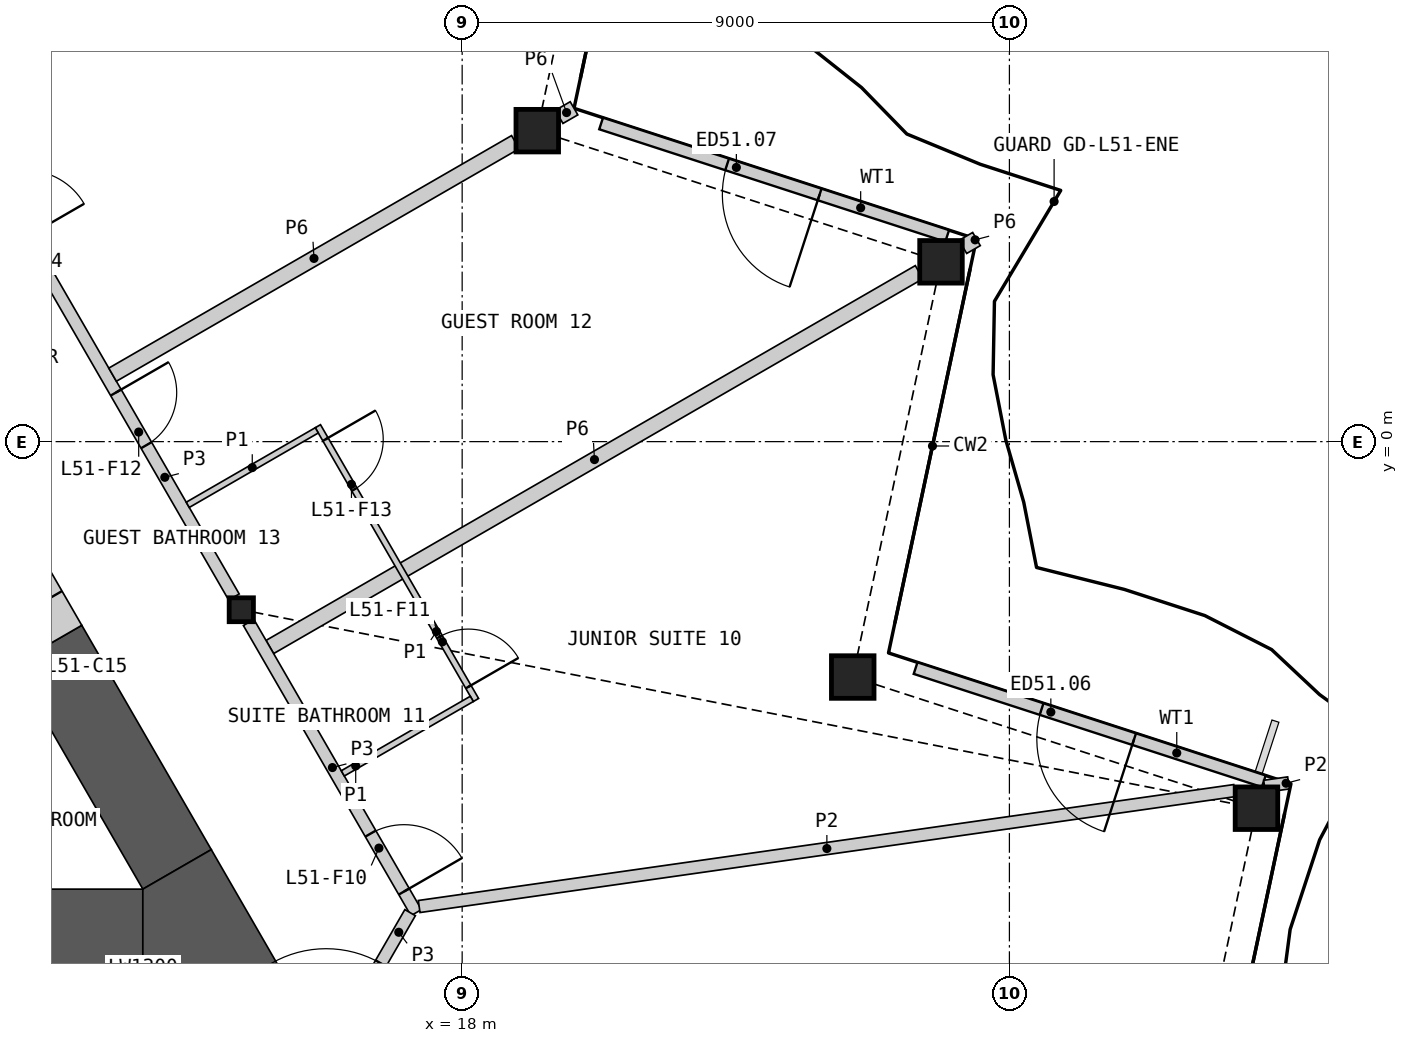
"""IFC4 building model, lengths in metres.
Left out: names, types, materials, properties, quantities, classifications, styles, units other than length and angle.
Written with IfcOpenShell. Run it as: python <this file> out.ifc"""

import sys

from ifc_helpers import new_model, si_unit, direction, frame, frame_2d, origin, origin_2d, place, context, subcontext, project, spatial, polyline, rectangle, hollow_rectangle, i_section, outline, extrude, element, fill, save


model = new_model("IFC4")
c1 = context("Model", 3, precision=1e-05, world=origin(), true_north=direction((0.0, 1.0)))
c2 = subcontext(c1, "Body", "Model", "MODEL_VIEW")
j1 = project(units=[si_unit("LENGTHUNIT", "METRE"), si_unit("PLANEANGLEUNIT", "RADIAN")], contexts=[c1])
p1 = place(None, origin())
s1 = spatial("IfcSite", under=j1, at=p1, CompositionType="ELEMENT")
p2 = place(p1, origin())
s2 = spatial("IfcBuilding", under=s1, at=p2, CompositionType="ELEMENT")
p3 = place(p2, frame((0.0, 0.0, 234.6)))
s3 = spatial("IfcBuildingStorey", under=s2, at=p3, CompositionType="ELEMENT", Elevation=234.6)
for number, where, z_axis, x_axis in (
    (1, (31.063, -6.029, 0.0), (0.0, 0.0, 1.0), (1.0, 0.0, 0.0)),
    (2, (24.423, -3.872, 0.0), (0.0, 0.0, 1.0), (1.0, 0.0, 0.0)),
    (3, (25.875, 2.957, 0.0), (0.0, 0.0, 1.0), (1.0, 0.0, 0.0)),
    (4, (19.235, 5.115, 0.0), (0.0, 0.0, 1.0), (1.0, 0.0, 0.0)),
):
    element("IfcColumn", number, at=place(p3, frame(where, z_axis=z_axis, x_axis=x_axis)), inside=s3, PredefinedType="COLUMN", context=c2, shape_type="SweptSolid", body=[
        extrude(hollow_rectangle(XDim=0.7, YDim=0.7, WallThickness=0.045, at=origin_2d()), origin(), (0.0, 0.0, 1.0), 3.6),
    ])
p4 = place(p3, frame((14.368, -2.765, 0.0), z_axis=(0.0, 0.0, 1.0), x_axis=(1.0, 0.0, 0.0)))
e5 = element("IfcColumn", 5, at=p4, inside=s3, PredefinedType="COLUMN", context=c2, shape_type="SweptSolid", body=[
    extrude(i_section(OverallWidth=0.399, OverallDepth=0.393, WebThickness=0.023, FlangeThickness=0.037, at=origin_2d()), origin(), (0.0, 0.0, 1.0), 3.6),
])
p5 = place(p3, frame((31.184, -5.586, 0.0), z_axis=(0.0, 0.0, 1.0), x_axis=(-0.95106415783, 0.30899347516, 0.0)))
e6 = element("IfcWall", 6, at=p5, inside=s3, PredefinedType="SOLIDWALL", context=c2, shape_type="SweptSolid", body=[
    extrude(rectangle(XDim=6.021, YDim=0.2, at=frame_2d((3.011, 0.0))), origin(), (0.0, 0.0, 1.0), 2.701),
])
p6 = place(p5, frame((2.243, 0.0, 0.0)))
e7 = element("IfcOpeningElement", 7, at=p6, cuts=e6, PredefinedType="OPENING", context=c2, shape_type="SweptSolid", body=[
    extrude(rectangle(XDim=1.6, YDim=2.4, at=frame_2d((0.8, 1.2))), frame((0.0, 0.11, 0.0), z_axis=(0.0, -1.0, 0.0), x_axis=(1.0, 0.0, 0.0)), (0.0, 0.0, 1.0), 0.22),
])
p7 = place(p3, frame((25.977, 3.383, 0.0), z_axis=(0.0, 0.0, 1.0), x_axis=(-0.951062846307, 0.308997511922, 0.0)))
e8 = element("IfcWall", 8, at=p7, inside=s3, PredefinedType="SOLIDWALL", context=c2, shape_type="SweptSolid", body=[
    extrude(rectangle(XDim=5.984, YDim=0.2, at=frame_2d((2.992, 0.0))), origin(), (0.0, 0.0, 1.0), 2.701),
])
p8 = place(p7, frame((2.206, 0.0, 0.0)))
e9 = element("IfcOpeningElement", 9, at=p8, cuts=e8, PredefinedType="OPENING", context=c2, shape_type="SweptSolid", body=[
    extrude(rectangle(XDim=1.6, YDim=2.4, at=frame_2d((0.8, 1.2))), frame((0.0, 0.11, 0.0), z_axis=(0.0, -1.0, 0.0), x_axis=(1.0, 0.0, 0.0)), (0.0, 0.0, 1.0), 0.22),
])
p9 = place(p3, frame((-12.748, -8.01, 0.0), z_axis=(0.0, 0.0, 1.0), x_axis=(1.0, 0.0, 0.0)))
e10 = element("IfcWall", 10, at=p9, inside=s3, PredefinedType="SHEAR", context=c2, shape_type="SweptSolid", body=[
    extrude(rectangle(XDim=25.497, YDim=1.3, at=frame_2d((12.748, 0.0))), origin(), (0.0, 0.0, 1.0), 3.25),
])
p10 = place(p3, frame((13.311, -7.035, 0.0), z_axis=(0.0, 0.0, 1.0), x_axis=(-0.500003555838, 0.866023350811, 0.0)))
e11 = element("IfcWall", 11, at=p10, inside=s3, PredefinedType="SHEAR", context=c2, shape_type="SweptSolid", body=[
    extrude(rectangle(XDim=4.26, YDim=1.3, at=frame_2d((2.13, 0.0))), origin(), (0.0, 0.0, 1.0), 3.25),
])
p11 = place(p3, origin())
e12 = element("IfcWall", 12, at=p11, inside=s3, PredefinedType="SHEAR", context=c2, shape_type="SweptSolid", body=[
    extrude(outline(polyline([(12.748, -8.66), (12.748, -7.36), (13.874, -6.71), (15.0, -8.66), (12.748, -8.66)])), origin(), (0.0, 0.0, 1.0), 3.25),
])
p12 = place(p3, frame((11.181, -3.346, 0.0), z_axis=(0.0, 0.0, 1.0), x_axis=(-0.499946605688, 0.86605622881, 0.0)))
e13 = element("IfcWall", 13, at=p12, inside=s3, PredefinedType="SHEAR", context=c2, shape_type="SweptSolid", body=[
    extrude(rectangle(XDim=2.2, YDim=1.3, at=frame_2d((1.1, 0.0))), origin(), (0.0, 0.0, 1.0), 3.25),
])
p13 = place(p12, frame((0.65, 0.0, 0.0)))
e14 = element("IfcOpeningElement", 14, at=p13, cuts=e13, PredefinedType="OPENING", context=c2, shape_type="SweptSolid", body=[
    extrude(rectangle(XDim=1.0, YDim=2.1, at=frame_2d((0.5, 1.05))), frame((0.0, 0.66, 0.0), z_axis=(0.0, -1.0, 0.0), x_axis=(1.0, 0.0, 0.0)), (0.0, 0.0, 1.0), 1.32),
])
p14 = place(p3, frame((14.837, -3.378, 0.0), z_axis=(0.0, 0.0, 1.0), x_axis=(0.866021706022, 0.500006404657, 0.0)))
e15 = element("IfcWall", 15, at=p14, inside=s3, PredefinedType="PARTITIONING", context=c2, shape_type="SweptSolid", body=[
    extrude(rectangle(XDim=12.33, YDim=0.25, at=frame_2d((6.165, 0.0))), origin(), (0.0, 0.0, 1.0), 2.404),
])
p15 = place(p3, frame((9.699, 5.321, 0.0), z_axis=(0.0, 0.0, 1.0), x_axis=(0.49998193945, -0.866035830797, 0.0)))
e16 = element("IfcWall", 16, at=p15, inside=s3, PredefinedType="PARTITIONING", context=c2, shape_type="SweptSolid", body=[
    extrude(rectangle(XDim=9.094, YDim=0.2, at=frame_2d((4.547, 0.0))), origin(), (0.0, 0.0, 1.0), 3.25),
])
p16 = place(p15, frame((5.212, 0.0, 0.0)))
e17 = element("IfcOpeningElement", 17, at=p16, cuts=e16, PredefinedType="OPENING", context=c2, shape_type="SweptSolid", body=[
    extrude(rectangle(XDim=1.0, YDim=2.1, at=frame_2d((0.5, 1.05))), frame((0.0, 0.11, 0.0), z_axis=(0.0, -1.0, 0.0), x_axis=(1.0, 0.0, 0.0)), (0.0, 0.0, 1.0), 0.22),
])
p17 = place(p15, frame((1.162, 0.0, 0.0)))
e18 = element("IfcOpeningElement", 18, at=p17, cuts=e16, PredefinedType="OPENING", context=c2, shape_type="SweptSolid", body=[
    extrude(rectangle(XDim=1.1, YDim=2.1, at=frame_2d((0.55, 1.05))), frame((0.0, 0.11, 0.0), z_axis=(0.0, -1.0, 0.0), x_axis=(1.0, 0.0, 0.0)), (0.0, 0.0, 1.0), 0.22),
])
p18 = place(p3, frame((12.251, 1.101, 0.0), z_axis=(0.0, 0.0, 1.0), x_axis=(0.866020808234, 0.500007959642, 0.0)))
e19 = element("IfcWall", 19, at=p18, inside=s3, PredefinedType="PARTITIONING", context=c2, shape_type="SweptSolid", body=[
    extrude(rectangle(XDim=7.649, YDim=0.25, at=frame_2d((3.824, 0.0))), origin(), (0.0, 0.0, 1.0), 2.404),
])
p19 = place(p3, frame((14.489, -2.975, 0.0), z_axis=(0.0, 0.0, 1.0), x_axis=(0.500017753321, -0.866015153657, 0.0)))
e20 = element("IfcWall", 20, at=p19, inside=s3, PredefinedType="PARTITIONING", context=c2, shape_type="SweptSolid", body=[
    extrude(rectangle(XDim=5.51, YDim=0.2, at=frame_2d((2.755, 0.0))), origin(), (0.0, 0.0, 1.0), 3.25),
])
p20 = place(p19, frame((4.01, 0.0, 0.0)))
e21 = element("IfcOpeningElement", 21, at=p20, cuts=e20, PredefinedType="OPENING", context=c2, shape_type="SweptSolid", body=[
    extrude(rectangle(XDim=1.1, YDim=2.1, at=frame_2d((0.55, 1.05))), frame((0.0, 0.11, 0.0), z_axis=(0.0, -1.0, 0.0), x_axis=(1.0, 0.0, 0.0)), (0.0, 0.0, 1.0), 0.22),
])
p21 = place(p3, frame((15.281, -10.974, 0.0), z_axis=(0.0, 0.0, 1.0), x_axis=(0.499958791762, 0.866049194065, 0.0)))
e22 = element("IfcWall", 22, at=p21, inside=s3, PredefinedType="PARTITIONING", context=c2, shape_type="SweptSolid", body=[
    extrude(rectangle(XDim=3.726, YDim=0.2, at=frame_2d((1.863, 0.0))), origin(), (0.0, 0.0, 1.0), 3.25),
])
p22 = place(p21, frame((0.963, 0.0, 0.0)))
e23 = element("IfcOpeningElement", 23, at=p22, cuts=e22, PredefinedType="OPENING", context=c2, shape_type="SweptSolid", body=[
    extrude(rectangle(XDim=1.8, YDim=2.1, at=frame_2d((0.9, 1.05))), frame((0.0, 0.11, 0.0), z_axis=(0.0, -1.0, 0.0), x_axis=(1.0, 0.0, 0.0)), (0.0, 0.0, 1.0), 0.22),
])
p23 = place(p3, frame((19.595, 5.341, 0.0), z_axis=(0.0, 0.0, 1.0), x_axis=(0.865998287773, 0.500046963369, 0.0)))
e24 = element("IfcWall", 24, at=p23, inside=s3, PredefinedType="PARTITIONING", context=c2, shape_type="SweptSolid", body=[
    extrude(rectangle(XDim=0.282, YDim=0.25, at=frame_2d((0.141, 0.0))), origin(), (0.0, 0.0, 1.0), 2.404),
])
p24 = place(p3, frame((26.235, 3.203, 0.0), z_axis=(0.0, 0.0, 1.0), x_axis=(0.86596515875, 0.500104332946, 0.0)))
e25 = element("IfcWall", 25, at=p24, inside=s3, PredefinedType="PARTITIONING", context=c2, shape_type="SweptSolid", body=[
    extrude(rectangle(XDim=0.258, YDim=0.25, at=frame_2d((0.129, 0.0))), origin(), (0.0, 0.0, 1.0), 2.404),
])
p25 = place(p3, frame((17.293, -7.646, 0.0), z_axis=(0.0, 0.0, 1.0), x_axis=(0.990042285303, 0.140770285614, 0.0)))
e26 = element("IfcWall", 26, at=p25, inside=s3, PredefinedType="PARTITIONING", context=c2, shape_type="SweptSolid", body=[
    extrude(rectangle(XDim=13.545, YDim=0.2, at=frame_2d((6.772, 0.0))), origin(), (0.0, 0.0, 1.0), 2.404),
])
p26 = place(p3, frame((31.196, -5.669, 0.0), z_axis=(0.0, 0.0, 1.0), x_axis=(0.990010701632, 0.140992236146, 0.0)))
e27 = element("IfcWall", 27, at=p26, inside=s3, PredefinedType="PARTITIONING", context=c2, shape_type="SweptSolid", body=[
    extrude(rectangle(XDim=0.398, YDim=0.2, at=frame_2d((0.199, 0.0))), origin(), (0.0, 0.0, 1.0), 2.404),
])
p27 = place(p3, frame((15.627, 0.254, 0.0), z_axis=(0.0, 0.0, 1.0), x_axis=(0.500027264788, -0.866009661879, 0.0)))
e28 = element("IfcWall", 28, at=p27, inside=s3, PredefinedType="PARTITIONING", context=c2, shape_type="SweptSolid", body=[
    extrude(rectangle(XDim=5.2, YDim=0.1, at=frame_2d((2.6, 0.0))), origin(), (0.0, 0.0, 1.0), 2.404),
])
p28 = place(p27, frame((4.0, 0.0, 0.0)))
e29 = element("IfcOpeningElement", 29, at=p28, cuts=e28, PredefinedType="OPENING", context=c2, shape_type="SweptSolid", body=[
    extrude(rectangle(XDim=0.95, YDim=2.1, at=frame_2d((0.475, 1.05))), frame((0.0, 0.06, 0.0), z_axis=(0.0, -1.0, 0.0), x_axis=(1.0, 0.0, 0.0)), (0.0, 0.0, 1.0), 0.12),
])
p29 = place(p27, frame((0.25, 0.0, 0.0)))
e30 = element("IfcOpeningElement", 30, at=p29, cuts=e28, PredefinedType="OPENING", context=c2, shape_type="SweptSolid", body=[
    extrude(rectangle(XDim=0.95, YDim=2.1, at=frame_2d((0.475, 1.05))), frame((0.0, 0.06, 0.0), z_axis=(0.0, -1.0, 0.0), x_axis=(1.0, 0.0, 0.0)), (0.0, 0.0, 1.0), 0.12),
])
p30 = place(p3, frame((16.037, -5.456, 0.0), z_axis=(0.0, 0.0, 1.0), x_axis=(0.865989751695, 0.500061746146, 0.0)))
e31 = element("IfcWall", 31, at=p30, inside=s3, PredefinedType="PARTITIONING", context=c2, shape_type="SweptSolid", body=[
    extrude(rectangle(XDim=2.45, YDim=0.1, at=frame_2d((1.225, 0.0))), origin(), (0.0, 0.0, 1.0), 2.404),
])
p31 = place(p3, frame((13.487, -1.04, 0.0), z_axis=(0.0, 0.0, 1.0), x_axis=(0.866032905446, 0.499987006516, 0.0)))
e32 = element("IfcWall", 32, at=p31, inside=s3, PredefinedType="PARTITIONING", context=c2, shape_type="SweptSolid", body=[
    extrude(rectangle(XDim=2.45, YDim=0.1, at=frame_2d((1.225, 0.0))), origin(), (0.0, 0.0, 1.0), 2.404),
])
p32 = place(p6, origin())
e33 = element("IfcDoor", 33, at=p32, inside=s3, OperationType="DOUBLE_DOOR_SINGLE_SWING", PredefinedType="DOOR", context=c2, shape_type="SweptSolid", body=[
    extrude(rectangle(XDim=1.6, YDim=2.4, at=frame_2d((0.8, 1.2))), frame((0.0, 0.025, 0.0), z_axis=(0.0, -1.0, 0.0), x_axis=(1.0, 0.0, 0.0)), (0.0, 0.0, 1.0), 0.05),
])
fill(e7, e33)
p33 = place(p8, origin())
e34 = element("IfcDoor", 34, at=p33, inside=s3, OperationType="DOUBLE_DOOR_SINGLE_SWING", PredefinedType="DOOR", context=c2, shape_type="SweptSolid", body=[
    extrude(rectangle(XDim=1.6, YDim=2.4, at=frame_2d((0.8, 1.2))), frame((0.0, 0.025, 0.0), z_axis=(0.0, -1.0, 0.0), x_axis=(1.0, 0.0, 0.0)), (0.0, 0.0, 1.0), 0.05),
])
fill(e9, e34)
p34 = place(p22, origin())
e35 = element("IfcDoor", 35, at=p34, inside=s3, OperationType="DOUBLE_DOOR_SINGLE_SWING", PredefinedType="DOOR", context=c2, shape_type="SweptSolid", body=[
    extrude(rectangle(XDim=1.8, YDim=2.1, at=frame_2d((0.9, 1.05))), frame((0.0, 0.025, 0.0), z_axis=(0.0, -1.0, 0.0), x_axis=(1.0, 0.0, 0.0)), (0.0, 0.0, 1.0), 0.05),
])
fill(e23, e35)
p35 = place(p20, origin())
e36 = element("IfcDoor", 36, at=p35, inside=s3, OperationType="SINGLE_SWING_RIGHT", PredefinedType="DOOR", context=c2, shape_type="SweptSolid", body=[
    extrude(rectangle(XDim=1.1, YDim=2.1, at=frame_2d((0.55, 1.05))), frame((0.0, 0.025, 0.0), z_axis=(0.0, -1.0, 0.0), x_axis=(1.0, 0.0, 0.0)), (0.0, 0.0, 1.0), 0.05),
])
fill(e21, e36)
p36 = place(p28, origin())
e37 = element("IfcDoor", 37, at=p36, inside=s3, OperationType="SINGLE_SWING_RIGHT", PredefinedType="DOOR", context=c2, shape_type="SweptSolid", body=[
    extrude(rectangle(XDim=0.95, YDim=2.1, at=frame_2d((0.475, 1.05))), frame((0.0, 0.025, 0.0), z_axis=(0.0, -1.0, 0.0), x_axis=(1.0, 0.0, 0.0)), (0.0, 0.0, 1.0), 0.05),
])
fill(e29, e37)
p37 = place(p16, origin())
e38 = element("IfcDoor", 38, at=p37, inside=s3, OperationType="SINGLE_SWING_LEFT", PredefinedType="DOOR", context=c2, shape_type="SweptSolid", body=[
    extrude(rectangle(XDim=1.0, YDim=2.1, at=frame_2d((0.5, 1.05))), frame((0.0, 0.025, 0.0), z_axis=(0.0, -1.0, 0.0), x_axis=(1.0, 0.0, 0.0)), (0.0, 0.0, 1.0), 0.05),
])
fill(e17, e38)
p38 = place(p29, origin())
e39 = element("IfcDoor", 39, at=p38, inside=s3, OperationType="SINGLE_SWING_LEFT", PredefinedType="DOOR", context=c2, shape_type="SweptSolid", body=[
    extrude(rectangle(XDim=0.95, YDim=2.1, at=frame_2d((0.475, 1.05))), frame((0.0, 0.025, 0.0), z_axis=(0.0, -1.0, 0.0), x_axis=(1.0, 0.0, 0.0)), (0.0, 0.0, 1.0), 0.05),
])
fill(e30, e39)
save(model, sys.argv[1])
